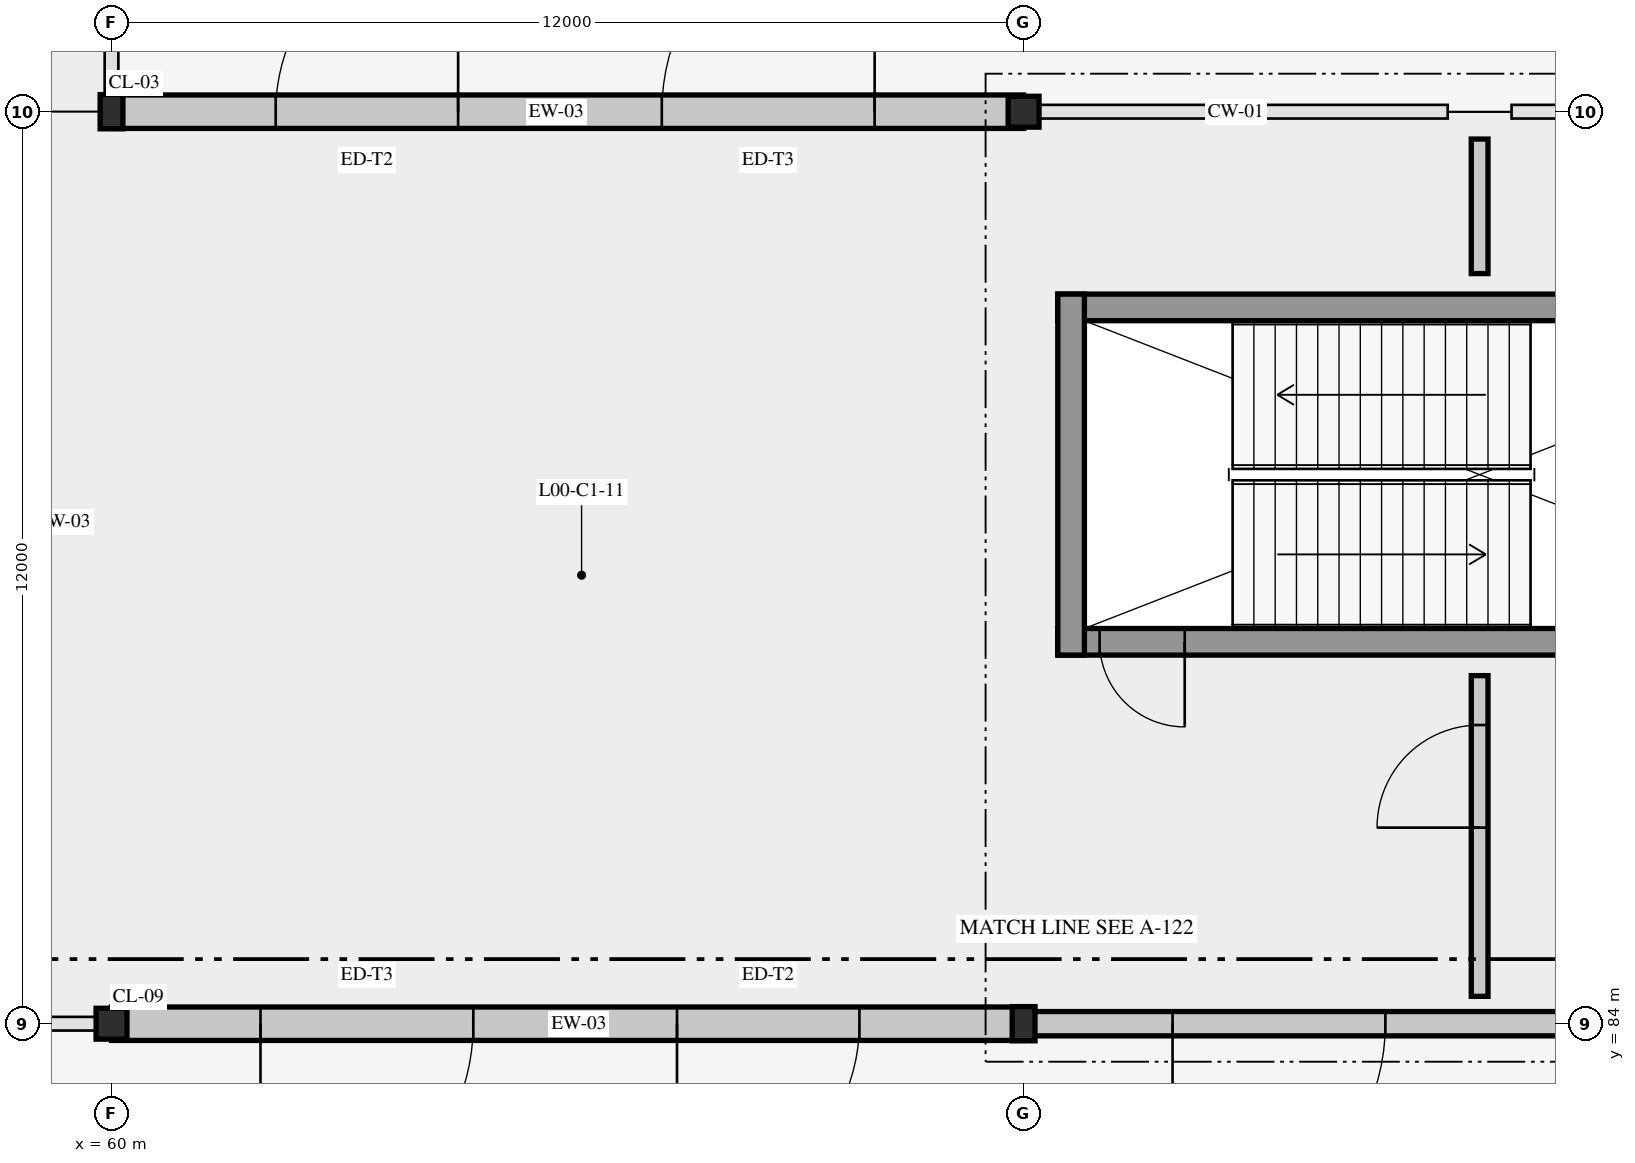
"""IFC4 building model, lengths in metres.
Left out: names, types, materials, properties, quantities, classifications, styles, units other than length and angle.
Written with IfcOpenShell. Run it as: python <this file> out.ifc"""

import sys

from ifc_helpers import new_model, si_unit, direction, frame, frame_2d, origin, origin_2d, place, context, subcontext, project, spatial, rectangle, hollow_circle, i_section, extrude, element, fill, save


model = new_model("IFC4")
c1 = context("Model", 3, precision=1e-05, world=origin(), true_north=direction((0.0, 1.0)))
c2 = subcontext(c1, "Body", "Model", "MODEL_VIEW")
j1 = project(units=[si_unit("LENGTHUNIT", "METRE"), si_unit("PLANEANGLEUNIT", "RADIAN")], contexts=[c1])
p1 = place(None, origin())
s1 = spatial("IfcSite", under=j1, at=p1, CompositionType="ELEMENT")
p2 = place(p1, origin())
s2 = spatial("IfcBuilding", under=s1, at=p2, CompositionType="ELEMENT")
p3 = place(p2, origin())
s3 = spatial("IfcBuildingStorey", under=s2, at=p3, CompositionType="ELEMENT", Elevation=0.0)
p4 = place(p3, frame((60.0, 84.0, 0.0), z_axis=(0.0, 0.0, 1.0), x_axis=(1.0, 0.0, 0.0)))
e1 = element("IfcColumn", 1, at=p4, inside=s3, PredefinedType="COLUMN", context=c2, shape_type="SweptSolid", body=[
    extrude(hollow_circle(Radius=0.203, WallThickness=0.016, at=origin_2d()), origin(), (0.0, 0.0, 1.0), 5.4),
])
for number, where, z_axis, x_axis in (
    (2, (60.0, 96.0, 0.0), (0.0, 0.0, 1.0), (1.0, 0.0, 0.0)),
    (3, (72.0, 84.0, 0.0), (0.0, 0.0, 1.0), (1.0, 0.0, 0.0)),
):
    element("IfcColumn", number, at=place(p3, frame(where, z_axis=z_axis, x_axis=x_axis)), inside=s3, PredefinedType="COLUMN", context=c2, shape_type="SweptSolid", body=[
        extrude(i_section(OverallWidth=0.3, OverallDepth=0.45, WebThickness=0.014, FlangeThickness=0.026, FilletRadius=0.027, at=origin_2d()), origin(), (0.0, 0.0, 1.0), 5.4),
    ])
p5 = place(p3, frame((72.0, 96.0, 0.0), z_axis=(0.0, 0.0, 1.0), x_axis=(1.0, 0.0, 0.0)))
e4 = element("IfcColumn", 4, at=p5, inside=s3, PredefinedType="COLUMN", context=c2, shape_type="SweptSolid", body=[
    extrude(hollow_circle(Radius=0.203, WallThickness=0.016, at=origin_2d()), origin(), (0.0, 0.0, 1.0), 5.4),
])
p6 = place(p3, frame((60.0, 84.0, 0.0), z_axis=(0.0, 0.0, 1.0), x_axis=(1.0, 0.0, 0.0)))
e5 = element("IfcWall", 5, at=p6, inside=s3, PredefinedType="SOLIDWALL", context=c2, shape_type="SweptSolid", body=[
    extrude(rectangle(XDim=12.0, YDim=0.44, at=frame_2d((6.0, 0.0))), origin(), (0.0, 0.0, 1.0), 4.52),
])
p7 = place(p6, frame((1.96, 0.0, 0.0)))
e6 = element("IfcOpeningElement", 6, at=p7, cuts=e5, PredefinedType="OPENING", context=c2, shape_type="SweptSolid", body=[
    extrude(rectangle(XDim=2.8, YDim=2.8, at=frame_2d((1.4, 1.4))), frame((0.0, 0.23, 0.0), z_axis=(0.0, -1.0, 0.0), x_axis=(1.0, 0.0, 0.0)), (0.0, 0.0, 1.0), 0.46),
])
p8 = place(p6, frame((7.44, 0.0, 0.0)))
e7 = element("IfcOpeningElement", 7, at=p8, cuts=e5, PredefinedType="OPENING", context=c2, shape_type="SweptSolid", body=[
    extrude(rectangle(XDim=2.4, YDim=2.6, at=frame_2d((1.2, 1.3))), frame((0.0, 0.23, 0.0), z_axis=(0.0, -1.0, 0.0), x_axis=(1.0, 0.0, 0.0)), (0.0, 0.0, 1.0), 0.46),
])
p9 = place(p3, frame((72.0, 96.0, 0.0), z_axis=(0.0, 0.0, 1.0), x_axis=(-1.0, 0.0, 0.0)))
e8 = element("IfcWall", 8, at=p9, inside=s3, PredefinedType="SOLIDWALL", context=c2, shape_type="SweptSolid", body=[
    extrude(rectangle(XDim=12.0, YDim=0.44, at=frame_2d((6.0, 0.0))), origin(), (0.0, 0.0, 1.0), 4.52),
])
p10 = place(p9, frame((1.96, 0.0, 0.0)))
e9 = element("IfcOpeningElement", 9, at=p10, cuts=e8, PredefinedType="OPENING", context=c2, shape_type="SweptSolid", body=[
    extrude(rectangle(XDim=2.8, YDim=2.8, at=frame_2d((1.4, 1.4))), frame((0.0, 0.23, 0.0), z_axis=(0.0, -1.0, 0.0), x_axis=(1.0, 0.0, 0.0)), (0.0, 0.0, 1.0), 0.46),
])
p11 = place(p9, frame((7.44, 0.0, 0.0)))
e10 = element("IfcOpeningElement", 10, at=p11, cuts=e8, PredefinedType="OPENING", context=c2, shape_type="SweptSolid", body=[
    extrude(rectangle(XDim=2.4, YDim=2.6, at=frame_2d((1.2, 1.3))), frame((0.0, 0.23, 0.0), z_axis=(0.0, -1.0, 0.0), x_axis=(1.0, 0.0, 0.0)), (0.0, 0.0, 1.0), 0.46),
])
p12 = place(p3, frame((72.0, 84.0, 0.0), z_axis=(0.0, 0.0, 1.0), x_axis=(1.0, 0.0, 0.0)))
e11 = element("IfcWall", 11, at=p12, inside=s3, PredefinedType="SOLIDWALL", context=c2, shape_type="SweptSolid", body=[
    extrude(rectangle(XDim=12.0, YDim=0.32, at=frame_2d((6.0, 0.0))), origin(), (0.0, 0.0, 1.0), 4.52),
])
p13 = place(p12, frame((1.96, 0.0, 0.0)))
e12 = element("IfcOpeningElement", 12, at=p13, cuts=e11, PredefinedType="OPENING", context=c2, shape_type="SweptSolid", body=[
    extrude(rectangle(XDim=2.8, YDim=2.8, at=frame_2d((1.4, 1.4))), frame((0.0, 0.17, 0.0), z_axis=(0.0, -1.0, 0.0), x_axis=(1.0, 0.0, 0.0)), (0.0, 0.0, 1.0), 0.34),
])
p14 = place(p12, frame((7.44, 0.0, 0.0)))
e13 = element("IfcOpeningElement", 13, at=p14, cuts=e11, PredefinedType="OPENING", context=c2, shape_type="SweptSolid", body=[
    extrude(rectangle(XDim=2.4, YDim=2.6, at=frame_2d((1.2, 1.3))), frame((0.0, 0.17, 0.0), z_axis=(0.0, -1.0, 0.0), x_axis=(1.0, 0.0, 0.0)), (0.0, 0.0, 1.0), 0.34),
])
p15 = place(p3, frame((72.45, 89.025, 0.0), z_axis=(0.0, 0.0, 1.0), x_axis=(1.0, 0.0, 0.0)))
e14 = element("IfcWall", 14, at=p15, inside=s3, PredefinedType="SHEAR", context=c2, shape_type="SweptSolid", body=[
    extrude(rectangle(XDim=11.1, YDim=0.35, at=frame_2d((5.55, 0.0))), origin(), (0.0, 0.0, 1.0), 5.14),
])
p16 = place(p15, frame((0.55, 0.0, 0.0)))
e15 = element("IfcOpeningElement", 15, at=p16, cuts=e14, PredefinedType="OPENING", context=c2, shape_type="SweptSolid", body=[
    extrude(rectangle(XDim=1.12, YDim=2.2, at=frame_2d((0.56, 1.1))), frame((0.0, 0.185, 0.0), z_axis=(0.0, -1.0, 0.0), x_axis=(1.0, 0.0, 0.0)), (0.0, 0.0, 1.0), 0.37),
])
p17 = place(p3, frame((83.55, 93.425, 0.0), z_axis=(0.0, 0.0, 1.0), x_axis=(-1.0, 0.0, 0.0)))
e16 = element("IfcWall", 16, at=p17, inside=s3, PredefinedType="SHEAR", context=c2, shape_type="SweptSolid", body=[
    extrude(rectangle(XDim=11.1, YDim=0.35, at=frame_2d((5.55, 0.0))), origin(), (0.0, 0.0, 1.0), 5.14),
])
p18 = place(p3, frame((72.625, 93.6, 0.0), z_axis=(0.0, 0.0, 1.0), x_axis=(0.0, -1.0, 0.0)))
e17 = element("IfcWall", 17, at=p18, inside=s3, PredefinedType="SHEAR", context=c2, shape_type="SweptSolid", body=[
    extrude(rectangle(XDim=4.75, YDim=0.35, at=frame_2d((2.375, 0.0))), origin(), (0.0, 0.0, 1.0), 5.14),
])
p19 = place(p3, frame((57.09, 90.6, 0.0), z_axis=(0.0, 0.0, 1.0), x_axis=(1.0, 0.0, 0.0)))
e18 = element("IfcWall", 18, at=p19, inside=s3, PredefinedType="PARTITIONING", context=c2, shape_type="SweptSolid", body=[
    extrude(rectangle(XDim=2.46, YDim=0.2, at=frame_2d((1.23, 0.0))), origin(), (0.0, 0.0, 1.0), 4.67),
])
p20 = place(p19, frame((0.65, 0.0, 0.0)))
e19 = element("IfcOpeningElement", 19, at=p20, cuts=e18, PredefinedType="OPENING", context=c2, shape_type="SweptSolid", body=[
    extrude(rectangle(XDim=1.05, YDim=2.2, at=frame_2d((0.525, 1.1))), frame((0.0, 0.11, 0.0), z_axis=(0.0, -1.0, 0.0), x_axis=(1.0, 0.0, 0.0)), (0.0, 0.0, 1.0), 0.22),
])
p21 = place(p3, frame((78.0, 84.36, 0.0), z_axis=(0.0, 0.0, 1.0), x_axis=(0.0, 1.0, 0.0)))
e20 = element("IfcWall", 20, at=p21, inside=s3, PredefinedType="PARTITIONING", context=c2, shape_type="SweptSolid", body=[
    extrude(rectangle(XDim=4.22, YDim=0.22, at=frame_2d((2.11, 0.0))), origin(), (0.0, 0.0, 1.0), 5.12),
])
p22 = place(p21, frame((2.22, 0.0, 0.0)))
e21 = element("IfcOpeningElement", 21, at=p22, cuts=e20, PredefinedType="OPENING", context=c2, shape_type="SweptSolid", body=[
    extrude(rectangle(XDim=1.35, YDim=2.3, at=frame_2d((0.675, 1.15))), frame((0.0, 0.12, 0.0), z_axis=(0.0, -1.0, 0.0), x_axis=(1.0, 0.0, 0.0)), (0.0, 0.0, 1.0), 0.24),
])
p23 = place(p3, frame((78.0, 93.87, 0.0), z_axis=(0.0, 0.0, 1.0), x_axis=(0.0, 1.0, 0.0)))
e22 = element("IfcWall", 22, at=p23, inside=s3, PredefinedType="PARTITIONING", context=c2, shape_type="SweptSolid", body=[
    extrude(rectangle(XDim=1.77, YDim=0.22, at=frame_2d((0.885, 0.0))), origin(), (0.0, 0.0, 1.0), 5.12),
])
p24 = place(p7, frame((2.8, 0.0, 0.0), z_axis=(0.0, 0.0, 1.0), x_axis=(-1.0, 0.0, 0.0)))
e23 = element("IfcDoor", 23, at=p24, inside=s3, OperationType="DOUBLE_DOOR_SINGLE_SWING", PredefinedType="DOOR", context=c2, shape_type="SweptSolid", body=[
    extrude(rectangle(XDim=2.8, YDim=2.8, at=frame_2d((1.4, 1.4))), frame((0.0, 0.025, 0.0), z_axis=(0.0, -1.0, 0.0), x_axis=(1.0, 0.0, 0.0)), (0.0, 0.0, 1.0), 0.05),
])
fill(e6, e23)
p25 = place(p8, frame((2.4, 0.0, 0.0), z_axis=(0.0, 0.0, 1.0), x_axis=(-1.0, 0.0, 0.0)))
e24 = element("IfcDoor", 24, at=p25, inside=s3, OperationType="DOUBLE_DOOR_SINGLE_SWING", PredefinedType="DOOR", context=c2, shape_type="SweptSolid", body=[
    extrude(rectangle(XDim=2.4, YDim=2.6, at=frame_2d((1.2, 1.3))), frame((0.0, 0.025, 0.0), z_axis=(0.0, -1.0, 0.0), x_axis=(1.0, 0.0, 0.0)), (0.0, 0.0, 1.0), 0.05),
])
fill(e7, e24)
p26 = place(p10, frame((2.8, 0.0, 0.0), z_axis=(0.0, 0.0, 1.0), x_axis=(-1.0, 0.0, 0.0)))
e25 = element("IfcDoor", 25, at=p26, inside=s3, OperationType="DOUBLE_DOOR_SINGLE_SWING", PredefinedType="DOOR", context=c2, shape_type="SweptSolid", body=[
    extrude(rectangle(XDim=2.8, YDim=2.8, at=frame_2d((1.4, 1.4))), frame((0.0, 0.025, 0.0), z_axis=(0.0, -1.0, 0.0), x_axis=(1.0, 0.0, 0.0)), (0.0, 0.0, 1.0), 0.05),
])
fill(e9, e25)
p27 = place(p11, frame((2.4, 0.0, 0.0), z_axis=(0.0, 0.0, 1.0), x_axis=(-1.0, 0.0, 0.0)))
e26 = element("IfcDoor", 26, at=p27, inside=s3, OperationType="DOUBLE_DOOR_SINGLE_SWING", PredefinedType="DOOR", context=c2, shape_type="SweptSolid", body=[
    extrude(rectangle(XDim=2.4, YDim=2.6, at=frame_2d((1.2, 1.3))), frame((0.0, 0.025, 0.0), z_axis=(0.0, -1.0, 0.0), x_axis=(1.0, 0.0, 0.0)), (0.0, 0.0, 1.0), 0.05),
])
fill(e10, e26)
p28 = place(p13, frame((2.8, 0.0, 0.0), z_axis=(0.0, 0.0, 1.0), x_axis=(-1.0, 0.0, 0.0)))
e27 = element("IfcDoor", 27, at=p28, inside=s3, OperationType="DOUBLE_DOOR_SINGLE_SWING", PredefinedType="DOOR", context=c2, shape_type="SweptSolid", body=[
    extrude(rectangle(XDim=2.8, YDim=2.8, at=frame_2d((1.4, 1.4))), frame((0.0, 0.025, 0.0), z_axis=(0.0, -1.0, 0.0), x_axis=(1.0, 0.0, 0.0)), (0.0, 0.0, 1.0), 0.05),
])
fill(e12, e27)
p29 = place(p16, frame((1.12, 0.0, 0.0), z_axis=(0.0, 0.0, 1.0), x_axis=(-1.0, 0.0, 0.0)))
e28 = element("IfcDoor", 28, at=p29, inside=s3, OperationType="SINGLE_SWING_RIGHT", PredefinedType="DOOR", context=c2, shape_type="SweptSolid", body=[
    extrude(rectangle(XDim=1.12, YDim=2.2, at=frame_2d((0.56, 1.1))), frame((0.0, 0.025, 0.0), z_axis=(0.0, -1.0, 0.0), x_axis=(1.0, 0.0, 0.0)), (0.0, 0.0, 1.0), 0.05),
])
fill(e15, e28)
p30 = place(p22, origin())
e29 = element("IfcDoor", 29, at=p30, inside=s3, OperationType="DOUBLE_SWING_LEFT", PredefinedType="DOOR", context=c2, shape_type="SweptSolid", body=[
    extrude(rectangle(XDim=1.35, YDim=2.3, at=frame_2d((0.675, 1.15))), frame((0.0, 0.025, 0.0), z_axis=(0.0, -1.0, 0.0), x_axis=(1.0, 0.0, 0.0)), (0.0, 0.0, 1.0), 0.05),
])
fill(e21, e29)
save(model, sys.argv[1])
